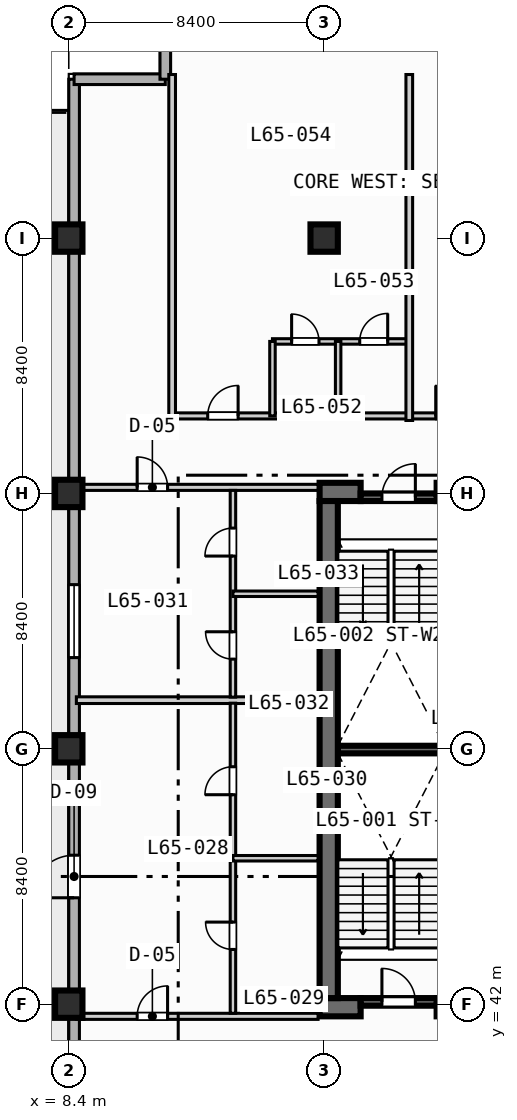
"""IFC4 building model, lengths in metres.
Left out: names, types, materials, properties, quantities, classifications, styles, units other than length and angle.
Written with IfcOpenShell. Run it as: python <this file> out.ifc"""

import sys

from ifc_helpers import new_model, si_unit, direction, frame, frame_2d, origin, origin_2d, place, context, subcontext, project, spatial, rectangle, extrude, element, fill, save


model = new_model("IFC4")
c1 = context("Model", 3, precision=1e-05, world=origin(), true_north=direction((0.0, 1.0)))
c2 = subcontext(c1, "Body", "Model", "MODEL_VIEW")
j1 = project(units=[si_unit("LENGTHUNIT", "METRE"), si_unit("PLANEANGLEUNIT", "RADIAN")], contexts=[c1])
p1 = place(None, origin())
s1 = spatial("IfcSite", under=j1, at=p1, CompositionType="ELEMENT")
p2 = place(p1, origin())
s2 = spatial("IfcBuilding", under=s1, at=p2, CompositionType="ELEMENT")
p3 = place(p2, frame((0.0, 0.0, 263.8)))
s3 = spatial("IfcBuildingStorey", under=s2, at=p3, CompositionType="ELEMENT", Elevation=263.8)
p4 = place(p3, frame((17.25, 50.375, 0.0), z_axis=(0.0, 0.0, 1.0), x_axis=(1.0, 0.0, 0.0)))
e1 = element("IfcWall", 1, at=p4, inside=s3, PredefinedType="SOLIDWALL", context=c2, shape_type="SweptSolid", body=[
    extrude(rectangle(XDim=3.5, YDim=0.25, at=frame_2d((1.75, 0.0))), origin(), (0.0, 0.0, 1.0), 3.47),
])
p5 = place(p3, frame((16.65, 41.9, 0.0), z_axis=(0.0, 0.0, 1.0), x_axis=(1.0, 0.0, 0.0)))
e2 = element("IfcWall", 2, at=p5, inside=s3, PredefinedType="SHEAR", context=c2, shape_type="SweptSolid", body=[
    extrude(rectangle(XDim=1.35, YDim=0.6, at=frame_2d((0.675, 0.0))), origin(), (0.0, 0.0, 1.0), 3.47),
])
p6 = place(p3, frame((20.5, 41.9, 0.0), z_axis=(0.0, 0.0, 1.0), x_axis=(1.0, 0.0, 0.0)))
e3 = element("IfcWall", 3, at=p6, inside=s3, PredefinedType="SHEAR", context=c2, shape_type="SweptSolid", body=[
    extrude(rectangle(XDim=5.0, YDim=0.6, at=frame_2d((2.5, 0.0))), origin(), (0.0, 0.0, 1.0), 3.47),
])
p7 = place(p3, frame((16.65, 58.85, 0.0), z_axis=(0.0, 0.0, 1.0), x_axis=(1.0, 0.0, 0.0)))
e4 = element("IfcWall", 4, at=p7, inside=s3, PredefinedType="SHEAR", context=c2, shape_type="SweptSolid", body=[
    extrude(rectangle(XDim=1.35, YDim=0.6, at=frame_2d((0.675, 0.0))), origin(), (0.0, 0.0, 1.0), 3.47),
])
p8 = place(p3, frame((20.5, 58.85, 0.0), z_axis=(0.0, 0.0, 1.0), x_axis=(1.0, 0.0, 0.0)))
e5 = element("IfcWall", 5, at=p8, inside=s3, PredefinedType="SHEAR", context=c2, shape_type="SweptSolid", body=[
    extrude(rectangle(XDim=5.0, YDim=0.6, at=frame_2d((2.5, 0.0))), origin(), (0.0, 0.0, 1.0), 3.47),
])
p9 = place(p3, frame((16.95, 42.2, 0.0), z_axis=(0.0, 0.0, 1.0), x_axis=(0.0, 1.0, 0.0)))
e6 = element("IfcWall", 6, at=p9, inside=s3, PredefinedType="SHEAR", context=c2, shape_type="SweptSolid", body=[
    extrude(rectangle(XDim=16.35, YDim=0.6, at=frame_2d((8.175, 0.0))), origin(), (0.0, 0.0, 1.0), 3.47),
])
for number, where, z_axis, x_axis in (
    (7, (8.4, 42.0, 0.0), (0.0, 0.0, 1.0), (1.0, 0.0, 0.0)),
    (8, (8.4, 50.4, 0.0), (0.0, 0.0, 1.0), (1.0, 0.0, 0.0)),
    (9, (8.4, 58.8, 0.0), (0.0, 0.0, 1.0), (1.0, 0.0, 0.0)),
    (10, (8.4, 67.2, 0.0), (0.0, 0.0, 1.0), (1.0, 0.0, 0.0)),
    (11, (16.8, 67.2, 0.0), (0.0, 0.0, 1.0), (1.0, 0.0, 0.0)),
):
    element("IfcColumn", number, at=place(p3, frame(where, z_axis=z_axis, x_axis=x_axis)), inside=s3, PredefinedType="COLUMN", context=c2, shape_type="SweptSolid", body=[
        extrude(rectangle(XDim=0.9, YDim=0.9, at=origin_2d()), origin(), (0.0, 0.0, 1.0), 3.7),
    ])
p10 = place(p3, frame((8.575, 11.575, 0.0), z_axis=(0.0, 0.0, 1.0), x_axis=(0.0, 1.0, 0.0)))
e12 = element("IfcWall", 12, at=p10, inside=s3, PredefinedType="STANDARD", context=c2, shape_type="SweptSolid", body=[
    extrude(rectangle(XDim=60.85, YDim=0.35, at=frame_2d((30.425, 0.0))), origin(), (0.0, 0.0, 1.0), 3.47),
])
p11 = place(p10, frame((33.925, 0.0, 0.0)))
e13 = element("IfcOpeningElement", 13, at=p11, cuts=e12, PredefinedType="OPENING", context=c2, shape_type="SweptSolid", body=[
    extrude(rectangle(XDim=1.4, YDim=2.2, at=frame_2d((0.7, 1.1))), frame((0.0, 0.185, 0.0), z_axis=(0.0, -1.0, 0.0), x_axis=(1.0, 0.0, 0.0)), (0.0, 0.0, 1.0), 0.37),
])
p12 = place(p10, frame((16.925, 0.0, 0.85)))
e14 = element("IfcOpeningElement", 14, at=p12, cuts=e12, PredefinedType="OPENING", context=c2, shape_type="SweptSolid", body=[
    extrude(rectangle(XDim=1.8, YDim=1.8, at=frame_2d((0.9, 0.9))), frame((0.0, 0.185, 0.0), z_axis=(0.0, -1.0, 0.0), x_axis=(1.0, 0.0, 0.0)), (0.0, 0.0, 1.0), 0.37),
])
p13 = place(p10, frame((25.025, 0.0, 0.85)))
e15 = element("IfcOpeningElement", 15, at=p13, cuts=e12, PredefinedType="OPENING", context=c2, shape_type="SweptSolid", body=[
    extrude(rectangle(XDim=2.4, YDim=1.95, at=frame_2d((1.2, 0.975))), frame((0.0, 0.185, 0.0), z_axis=(0.0, -1.0, 0.0), x_axis=(1.0, 0.0, 0.0)), (0.0, 0.0, 1.0), 0.37),
])
p14 = place(p10, frame((41.825, 0.0, 0.85)))
e16 = element("IfcOpeningElement", 16, at=p14, cuts=e12, PredefinedType="OPENING", context=c2, shape_type="SweptSolid", body=[
    extrude(rectangle(XDim=2.4, YDim=1.95, at=frame_2d((1.2, 0.975))), frame((0.0, 0.185, 0.0), z_axis=(0.0, -1.0, 0.0), x_axis=(1.0, 0.0, 0.0)), (0.0, 0.0, 1.0), 0.37),
])
for number, where, z_axis, x_axis in (
    (17, (8.575, 72.425, 0.0), (0.0, 0.0, 1.0), (1.0, 0.0, 0.0)),
    (18, (11.575, 72.425, 0.0), (0.0, 0.0, 1.0), (0.0, 1.0, 0.0)),
):
    element("IfcWall", number, at=place(p3, frame(where, z_axis=z_axis, x_axis=x_axis)), inside=s3, PredefinedType="STANDARD", context=c2, shape_type="SweptSolid", body=[
        extrude(rectangle(XDim=3.0, YDim=0.35, at=frame_2d((1.5, 0.0))), origin(), (0.0, 0.0, 1.0), 3.47),
    ])
p15 = place(p3, frame((18.0, 42.075, 0.0), z_axis=(0.0, 0.0, 1.0), x_axis=(1.0, 0.0, 0.0)))
e19 = element("IfcWall", 19, at=p15, inside=s3, PredefinedType="SOLIDWALL", context=c2, shape_type="SweptSolid", body=[
    extrude(rectangle(XDim=2.5, YDim=0.25, at=frame_2d((1.25, 0.0))), origin(), (0.0, 0.0, 1.0), 3.47),
])
p16 = place(p15, frame((0.7, 0.0, 0.0)))
e20 = element("IfcOpeningElement", 20, at=p16, cuts=e19, PredefinedType="OPENING", context=c2, shape_type="SweptSolid", body=[
    extrude(rectangle(XDim=1.1, YDim=2.15, at=frame_2d((0.55, 1.075))), frame((0.0, 0.135, 0.0), z_axis=(0.0, -1.0, 0.0), x_axis=(1.0, 0.0, 0.0)), (0.0, 0.0, 1.0), 0.27),
])
p17 = place(p3, frame((18.0, 58.675, 0.0), z_axis=(0.0, 0.0, 1.0), x_axis=(1.0, 0.0, 0.0)))
e21 = element("IfcWall", 21, at=p17, inside=s3, PredefinedType="SOLIDWALL", context=c2, shape_type="SweptSolid", body=[
    extrude(rectangle(XDim=2.5, YDim=0.25, at=frame_2d((1.25, 0.0))), origin(), (0.0, 0.0, 1.0), 3.47),
])
p18 = place(p17, frame((0.7, 0.0, 0.0)))
e22 = element("IfcOpeningElement", 22, at=p18, cuts=e21, PredefinedType="OPENING", context=c2, shape_type="SweptSolid", body=[
    extrude(rectangle(XDim=1.1, YDim=2.15, at=frame_2d((0.55, 1.075))), frame((0.0, 0.135, 0.0), z_axis=(0.0, -1.0, 0.0), x_axis=(1.0, 0.0, 0.0)), (0.0, 0.0, 1.0), 0.27),
])
p19 = place(p3, frame((8.65, 41.6, 0.0), z_axis=(0.0, 0.0, 1.0), x_axis=(1.0, 0.0, 0.0)))
e23 = element("IfcWall", 23, at=p19, inside=s3, PredefinedType="PARTITIONING", context=c2, shape_type="SweptSolid", body=[
    extrude(rectangle(XDim=7.95, YDim=0.2, at=frame_2d((3.975, 0.0))), origin(), (0.0, 0.0, 1.0), 3.47),
])
p20 = place(p19, frame((2.0, 0.0, 0.0)))
e24 = element("IfcOpeningElement", 24, at=p20, cuts=e23, PredefinedType="OPENING", context=c2, shape_type="SweptSolid", body=[
    extrude(rectangle(XDim=1.0, YDim=2.15, at=frame_2d((0.5, 1.075))), frame((0.0, 0.11, 0.0), z_axis=(0.0, -1.0, 0.0), x_axis=(1.0, 0.0, 0.0)), (0.0, 0.0, 1.0), 0.22),
])
p21 = place(p3, frame((8.65, 59.0, 0.0), z_axis=(0.0, 0.0, 1.0), x_axis=(1.0, 0.0, 0.0)))
e25 = element("IfcWall", 25, at=p21, inside=s3, PredefinedType="PARTITIONING", context=c2, shape_type="SweptSolid", body=[
    extrude(rectangle(XDim=7.95, YDim=0.2, at=frame_2d((3.975, 0.0))), origin(), (0.0, 0.0, 1.0), 3.007),
])
p22 = place(p21, frame((2.0, 0.0, 0.0)))
e26 = element("IfcOpeningElement", 26, at=p22, cuts=e25, PredefinedType="OPENING", context=c2, shape_type="SweptSolid", body=[
    extrude(rectangle(XDim=1.0, YDim=2.15, at=frame_2d((0.5, 1.075))), frame((0.0, 0.11, 0.0), z_axis=(0.0, -1.0, 0.0), x_axis=(1.0, 0.0, 0.0)), (0.0, 0.0, 1.0), 0.22),
])
p23 = place(p3, frame((8.65, 52.0, 0.0), z_axis=(0.0, 0.0, 1.0), x_axis=(1.0, 0.0, 0.0)))
e27 = element("IfcWall", 27, at=p23, inside=s3, PredefinedType="PARTITIONING", context=c2, shape_type="SweptSolid", body=[
    extrude(rectangle(XDim=7.95, YDim=0.22, at=frame_2d((3.975, 0.0))), origin(), (0.0, 0.0, 1.0), 3.47),
])
p24 = place(p3, frame((13.8, 41.7, 0.0), z_axis=(0.0, 0.0, 1.0), x_axis=(0.0, 1.0, 0.0)))
e28 = element("IfcWall", 28, at=p24, inside=s3, PredefinedType="PLUMBINGWALL", context=c2, shape_type="SweptSolid", body=[
    extrude(rectangle(XDim=10.2, YDim=0.18, at=frame_2d((5.1, 0.0))), origin(), (0.0, 0.0, 1.0), 3.47),
])
p25 = place(p24, frame((2.1, 0.0, 0.0)))
e29 = element("IfcOpeningElement", 29, at=p25, cuts=e28, PredefinedType="OPENING", context=c2, shape_type="SweptSolid", body=[
    extrude(rectangle(XDim=0.9, YDim=2.1, at=frame_2d((0.45, 1.05))), frame((0.0, 0.1, 0.0), z_axis=(0.0, -1.0, 0.0), x_axis=(1.0, 0.0, 0.0)), (0.0, 0.0, 1.0), 0.2),
])
p26 = place(p24, frame((7.19, 0.0, 0.0)))
e30 = element("IfcOpeningElement", 30, at=p26, cuts=e28, PredefinedType="OPENING", context=c2, shape_type="SweptSolid", body=[
    extrude(rectangle(XDim=0.92, YDim=2.1, at=frame_2d((0.46, 1.05))), frame((0.0, 0.1, 0.0), z_axis=(0.0, -1.0, 0.0), x_axis=(1.0, 0.0, 0.0)), (0.0, 0.0, 1.0), 0.2),
])
p27 = place(p3, frame((13.8, 46.8, 0.0), z_axis=(0.0, 0.0, 1.0), x_axis=(1.0, 0.0, 0.0)))
e31 = element("IfcWall", 31, at=p27, inside=s3, PredefinedType="PLUMBINGWALL", context=c2, shape_type="SweptSolid", body=[
    extrude(rectangle(XDim=2.8, YDim=0.18, at=frame_2d((1.4, 0.0))), origin(), (0.0, 0.0, 1.0), 3.47),
])
p28 = place(p3, frame((13.8, 52.1, 0.0), z_axis=(0.0, 0.0, 1.0), x_axis=(0.0, 1.0, 0.0)))
e32 = element("IfcWall", 32, at=p28, inside=s3, PredefinedType="PLUMBINGWALL", context=c2, shape_type="SweptSolid", body=[
    extrude(rectangle(XDim=6.8, YDim=0.18, at=frame_2d((3.4, 0.0))), origin(), (0.0, 0.0, 1.0), 3.47),
])
p29 = place(p28, frame((1.25, 0.0, 0.0)))
e33 = element("IfcOpeningElement", 33, at=p29, cuts=e32, PredefinedType="OPENING", context=c2, shape_type="SweptSolid", body=[
    extrude(rectangle(XDim=0.9, YDim=2.1, at=frame_2d((0.45, 1.05))), frame((0.0, 0.1, 0.0), z_axis=(0.0, -1.0, 0.0), x_axis=(1.0, 0.0, 0.0)), (0.0, 0.0, 1.0), 0.2),
])
p30 = place(p28, frame((4.64, 0.0, 0.0)))
e34 = element("IfcOpeningElement", 34, at=p30, cuts=e32, PredefinedType="OPENING", context=c2, shape_type="SweptSolid", body=[
    extrude(rectangle(XDim=0.92, YDim=2.1, at=frame_2d((0.46, 1.05))), frame((0.0, 0.1, 0.0), z_axis=(0.0, -1.0, 0.0), x_axis=(1.0, 0.0, 0.0)), (0.0, 0.0, 1.0), 0.2),
])
p31 = place(p3, frame((13.8, 55.5, 0.0), z_axis=(0.0, 0.0, 1.0), x_axis=(1.0, 0.0, 0.0)))
e35 = element("IfcWall", 35, at=p31, inside=s3, PredefinedType="PLUMBINGWALL", context=c2, shape_type="SweptSolid", body=[
    extrude(rectangle(XDim=2.8, YDim=0.18, at=frame_2d((1.4, 0.0))), origin(), (0.0, 0.0, 1.0), 3.47),
])
p32 = place(p3, frame((11.8, 61.35, 0.0), z_axis=(0.0, 0.0, 1.0), x_axis=(1.0, 0.0, 0.0)))
e36 = element("IfcWall", 36, at=p32, inside=s3, PredefinedType="PARTITIONING", context=c2, shape_type="SweptSolid", body=[
    extrude(rectangle(XDim=21.35, YDim=0.2, at=frame_2d((10.675, 0.0))), origin(), (0.0, 0.0, 1.0), 3.47),
])
p33 = place(p32, frame((1.17, 0.0, 0.0)))
e37 = element("IfcOpeningElement", 37, at=p33, cuts=e36, PredefinedType="OPENING", context=c2, shape_type="SweptSolid", body=[
    extrude(rectangle(XDim=1.0, YDim=2.15, at=frame_2d((0.5, 1.075))), frame((0.0, 0.11, 0.0), z_axis=(0.0, -1.0, 0.0), x_axis=(1.0, 0.0, 0.0)), (0.0, 0.0, 1.0), 0.22),
])
p34 = place(p32, frame((8.67, 0.0, 0.0)))
e38 = element("IfcOpeningElement", 38, at=p34, cuts=e36, PredefinedType="OPENING", context=c2, shape_type="SweptSolid", body=[
    extrude(rectangle(XDim=1.0, YDim=2.15, at=frame_2d((0.5, 1.075))), frame((0.0, 0.11, 0.0), z_axis=(0.0, -1.0, 0.0), x_axis=(1.0, 0.0, 0.0)), (0.0, 0.0, 1.0), 0.22),
])
p35 = place(p32, frame((15.445, 0.0, 0.0)))
e39 = element("IfcOpeningElement", 39, at=p35, cuts=e36, PredefinedType="OPENING", context=c2, shape_type="SweptSolid", body=[
    extrude(rectangle(XDim=1.0, YDim=2.15, at=frame_2d((0.5, 1.075))), frame((0.0, 0.11, 0.0), z_axis=(0.0, -1.0, 0.0), x_axis=(1.0, 0.0, 0.0)), (0.0, 0.0, 1.0), 0.22),
])
p36 = place(p3, frame((11.8, 61.2, 0.0), z_axis=(0.0, 0.0, 1.0), x_axis=(0.0, 1.0, 0.0)))
e40 = element("IfcWall", 40, at=p36, inside=s3, PredefinedType="PARTITIONING", context=c2, shape_type="SweptSolid", body=[
    extrude(rectangle(XDim=11.38, YDim=0.22, at=frame_2d((5.69, 0.0))), origin(), (0.0, 0.0, 1.0), 3.47),
])
p37 = place(p3, frame((15.1, 63.8, 0.0), z_axis=(0.0, 0.0, 1.0), x_axis=(1.0, 0.0, 0.0)))
e41 = element("IfcWall", 41, at=p37, inside=s3, PredefinedType="PLUMBINGWALL", context=c2, shape_type="SweptSolid", body=[
    extrude(rectangle(XDim=4.5, YDim=0.18, at=frame_2d((2.25, 0.0))), origin(), (0.0, 0.0, 1.0), 3.47),
])
p38 = place(p37, frame((0.63, 0.0, 0.0)))
e42 = element("IfcOpeningElement", 42, at=p38, cuts=e41, PredefinedType="OPENING", context=c2, shape_type="SweptSolid", body=[
    extrude(rectangle(XDim=0.9, YDim=2.1, at=frame_2d((0.45, 1.05))), frame((0.0, 0.1, 0.0), z_axis=(0.0, -1.0, 0.0), x_axis=(1.0, 0.0, 0.0)), (0.0, 0.0, 1.0), 0.2),
])
p39 = place(p37, frame((2.87, 0.0, 0.0)))
e43 = element("IfcOpeningElement", 43, at=p39, cuts=e41, PredefinedType="OPENING", context=c2, shape_type="SweptSolid", body=[
    extrude(rectangle(XDim=0.92, YDim=2.1, at=frame_2d((0.46, 1.05))), frame((0.0, 0.1, 0.0), z_axis=(0.0, -1.0, 0.0), x_axis=(1.0, 0.0, 0.0)), (0.0, 0.0, 1.0), 0.2),
])
for number, where, z_axis, x_axis in (
    (44, (15.1, 61.35, 0.0), (0.0, 0.0, 1.0), (0.0, 1.0, 0.0)),
    (45, (17.26, 61.35, 0.0), (0.0, 0.0, 1.0), (0.0, 1.0, 0.0)),
):
    element("IfcWall", number, at=place(p3, frame(where, z_axis=z_axis, x_axis=x_axis)), inside=s3, PredefinedType="PLUMBINGWALL", context=c2, shape_type="SweptSolid", body=[
        extrude(rectangle(XDim=2.45, YDim=0.18, at=frame_2d((1.225, 0.0))), origin(), (0.0, 0.0, 1.0), 3.47),
    ])
p40 = place(p3, frame((19.6, 61.2, 0.0), z_axis=(0.0, 0.0, 1.0), x_axis=(0.0, 1.0, 0.0)))
e46 = element("IfcWall", 46, at=p40, inside=s3, PredefinedType="PARTITIONING", context=c2, shape_type="SweptSolid", body=[
    extrude(rectangle(XDim=11.38, YDim=0.22, at=frame_2d((5.69, 0.0))), origin(), (0.0, 0.0, 1.0), 3.47),
])
p41 = place(p11, origin())
e47 = element("IfcDoor", 47, at=p41, inside=s3, OperationType="SINGLE_SWING_LEFT", PredefinedType="DOOR", context=c2, shape_type="SweptSolid", body=[
    extrude(rectangle(XDim=1.4, YDim=2.2, at=frame_2d((0.7, 1.1))), frame((0.0, 0.025, 0.0), z_axis=(0.0, -1.0, 0.0), x_axis=(1.0, 0.0, 0.0)), (0.0, 0.0, 1.0), 0.05),
])
fill(e13, e47)
p42 = place(p14, origin())
e48 = element("IfcWindow", 48, at=p42, inside=s3, PartitioningType="SINGLE_PANEL", PredefinedType="WINDOW", context=c2, shape_type="SweptSolid", body=[
    extrude(rectangle(XDim=2.4, YDim=1.95, at=frame_2d((1.2, 0.975))), frame((0.0, 0.03, 0.0), z_axis=(0.0, -1.0, 0.0), x_axis=(1.0, 0.0, 0.0)), (0.0, 0.0, 1.0), 0.06),
])
fill(e16, e48)
p43 = place(p16, origin())
e49 = element("IfcDoor", 49, at=p43, inside=s3, OperationType="SINGLE_SWING_LEFT", PredefinedType="DOOR", context=c2, shape_type="SweptSolid", body=[
    extrude(rectangle(XDim=1.1, YDim=2.15, at=frame_2d((0.55, 1.075))), frame((0.0, 0.025, 0.0), z_axis=(0.0, -1.0, 0.0), x_axis=(1.0, 0.0, 0.0)), (0.0, 0.0, 1.0), 0.05),
])
fill(e20, e49)
p44 = place(p18, origin())
e50 = element("IfcDoor", 50, at=p44, inside=s3, OperationType="SINGLE_SWING_RIGHT", PredefinedType="DOOR", context=c2, shape_type="SweptSolid", body=[
    extrude(rectangle(XDim=1.1, YDim=2.15, at=frame_2d((0.55, 1.075))), frame((0.0, 0.025, 0.0), z_axis=(0.0, -1.0, 0.0), x_axis=(1.0, 0.0, 0.0)), (0.0, 0.0, 1.0), 0.05),
])
fill(e22, e50)
p45 = place(p20, origin())
e51 = element("IfcDoor", 51, at=p45, inside=s3, OperationType="SINGLE_SWING_RIGHT", PredefinedType="DOOR", context=c2, shape_type="SweptSolid", body=[
    extrude(rectangle(XDim=1.0, YDim=2.15, at=frame_2d((0.5, 1.075))), frame((0.0, 0.025, 0.0), z_axis=(0.0, -1.0, 0.0), x_axis=(1.0, 0.0, 0.0)), (0.0, 0.0, 1.0), 0.05),
])
fill(e24, e51)
p46 = place(p22, origin())
e52 = element("IfcDoor", 52, at=p46, inside=s3, OperationType="SINGLE_SWING_LEFT", PredefinedType="DOOR", context=c2, shape_type="SweptSolid", body=[
    extrude(rectangle(XDim=1.0, YDim=2.15, at=frame_2d((0.5, 1.075))), frame((0.0, 0.025, 0.0), z_axis=(0.0, -1.0, 0.0), x_axis=(1.0, 0.0, 0.0)), (0.0, 0.0, 1.0), 0.05),
])
fill(e26, e52)
p47 = place(p25, origin())
e53 = element("IfcDoor", 53, at=p47, inside=s3, OperationType="SINGLE_SWING_RIGHT", PredefinedType="DOOR", context=c2, shape_type="SweptSolid", body=[
    extrude(rectangle(XDim=0.9, YDim=2.1, at=frame_2d((0.45, 1.05))), frame((0.0, 0.025, 0.0), z_axis=(0.0, -1.0, 0.0), x_axis=(1.0, 0.0, 0.0)), (0.0, 0.0, 1.0), 0.05),
])
fill(e29, e53)
p48 = place(p26, origin())
e54 = element("IfcDoor", 54, at=p48, inside=s3, OperationType="SINGLE_SWING_LEFT", PredefinedType="DOOR", context=c2, shape_type="SweptSolid", body=[
    extrude(rectangle(XDim=0.92, YDim=2.1, at=frame_2d((0.46, 1.05))), frame((0.0, 0.025, 0.0), z_axis=(0.0, -1.0, 0.0), x_axis=(1.0, 0.0, 0.0)), (0.0, 0.0, 1.0), 0.05),
])
fill(e30, e54)
p49 = place(p29, origin())
e55 = element("IfcDoor", 55, at=p49, inside=s3, OperationType="SINGLE_SWING_RIGHT", PredefinedType="DOOR", context=c2, shape_type="SweptSolid", body=[
    extrude(rectangle(XDim=0.9, YDim=2.1, at=frame_2d((0.45, 1.05))), frame((0.0, 0.025, 0.0), z_axis=(0.0, -1.0, 0.0), x_axis=(1.0, 0.0, 0.0)), (0.0, 0.0, 1.0), 0.05),
])
fill(e33, e55)
p50 = place(p30, origin())
e56 = element("IfcDoor", 56, at=p50, inside=s3, OperationType="SINGLE_SWING_LEFT", PredefinedType="DOOR", context=c2, shape_type="SweptSolid", body=[
    extrude(rectangle(XDim=0.92, YDim=2.1, at=frame_2d((0.46, 1.05))), frame((0.0, 0.025, 0.0), z_axis=(0.0, -1.0, 0.0), x_axis=(1.0, 0.0, 0.0)), (0.0, 0.0, 1.0), 0.05),
])
fill(e34, e56)
p51 = place(p33, origin())
e57 = element("IfcDoor", 57, at=p51, inside=s3, OperationType="SINGLE_SWING_RIGHT", PredefinedType="DOOR", context=c2, shape_type="SweptSolid", body=[
    extrude(rectangle(XDim=1.0, YDim=2.15, at=frame_2d((0.5, 1.075))), frame((0.0, 0.025, 0.0), z_axis=(0.0, -1.0, 0.0), x_axis=(1.0, 0.0, 0.0)), (0.0, 0.0, 1.0), 0.05),
])
fill(e37, e57)
p52 = place(p34, origin())
e58 = element("IfcDoor", 58, at=p52, inside=s3, OperationType="SINGLE_SWING_LEFT", PredefinedType="DOOR", context=c2, shape_type="SweptSolid", body=[
    extrude(rectangle(XDim=1.0, YDim=2.15, at=frame_2d((0.5, 1.075))), frame((0.0, 0.025, 0.0), z_axis=(0.0, -1.0, 0.0), x_axis=(1.0, 0.0, 0.0)), (0.0, 0.0, 1.0), 0.05),
])
fill(e38, e58)
p53 = place(p38, origin())
e59 = element("IfcDoor", 59, at=p53, inside=s3, OperationType="SINGLE_SWING_LEFT", PredefinedType="DOOR", context=c2, shape_type="SweptSolid", body=[
    extrude(rectangle(XDim=0.9, YDim=2.1, at=frame_2d((0.45, 1.05))), frame((0.0, 0.025, 0.0), z_axis=(0.0, -1.0, 0.0), x_axis=(1.0, 0.0, 0.0)), (0.0, 0.0, 1.0), 0.05),
])
fill(e42, e59)
p54 = place(p39, origin())
e60 = element("IfcDoor", 60, at=p54, inside=s3, OperationType="SINGLE_SWING_RIGHT", PredefinedType="DOOR", context=c2, shape_type="SweptSolid", body=[
    extrude(rectangle(XDim=0.92, YDim=2.1, at=frame_2d((0.46, 1.05))), frame((0.0, 0.025, 0.0), z_axis=(0.0, -1.0, 0.0), x_axis=(1.0, 0.0, 0.0)), (0.0, 0.0, 1.0), 0.05),
])
fill(e43, e60)
save(model, sys.argv[1])
